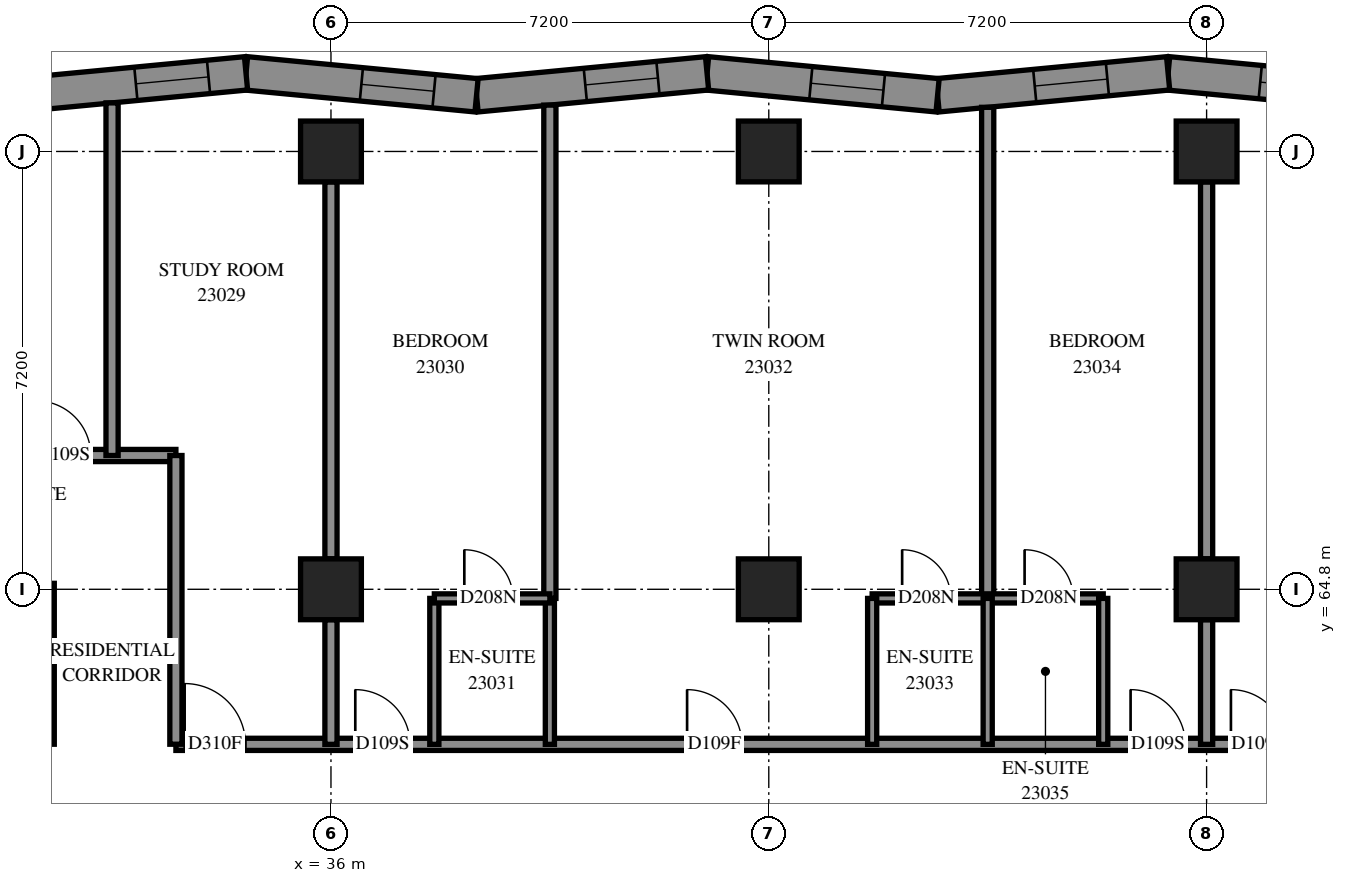
"""IFC4 building model, lengths in metres.
Left out: names, types, materials, properties, quantities, classifications, styles, units other than length and angle.
Written with IfcOpenShell. Run it as: python <this file> out.ifc"""

import sys

from ifc_helpers import new_model, si_unit, direction, frame, frame_2d, origin, origin_2d, place, context, subcontext, project, spatial, polyline, rectangle, outline, extrude, element, fill, save


model = new_model("IFC4")
c1 = context("Model", 3, precision=1e-05, world=origin(), true_north=direction((0.0, 1.0)))
c2 = subcontext(c1, "Body", "Model", "MODEL_VIEW")
j1 = project(units=[si_unit("LENGTHUNIT", "METRE"), si_unit("PLANEANGLEUNIT", "RADIAN")], contexts=[c1])
p1 = place(None, origin())
s1 = spatial("IfcSite", under=j1, at=p1, CompositionType="ELEMENT")
p2 = place(p1, origin())
s2 = spatial("IfcBuilding", under=s1, at=p2, CompositionType="ELEMENT")
p3 = place(p2, frame((0.0, 0.0, 88.0)))
s3 = spatial("IfcBuildingStorey", under=s2, at=p3, CompositionType="ELEMENT", Elevation=88.0)
for number, where, z_axis, x_axis in (
    (1, (36.0, 64.8, 0.0), (0.0, 0.0, 1.0), (1.0, 0.0, 0.0)),
    (2, (36.0, 72.0, 0.0), (0.0, 0.0, 1.0), (1.0, 0.0, 0.0)),
    (3, (43.2, 64.8, 0.0), (0.0, 0.0, 1.0), (1.0, 0.0, 0.0)),
    (4, (43.2, 72.0, 0.0), (0.0, 0.0, 1.0), (1.0, 0.0, 0.0)),
    (5, (50.4, 64.8, 0.0), (0.0, 0.0, 1.0), (1.0, 0.0, 0.0)),
    (6, (50.4, 72.0, 0.0), (0.0, 0.0, 1.0), (1.0, 0.0, 0.0)),
):
    element("IfcColumn", number, at=place(p3, frame(where, z_axis=z_axis, x_axis=x_axis)), inside=s3, PredefinedType="COLUMN", context=c2, shape_type="SweptSolid", body=[
        extrude(rectangle(XDim=1.0, YDim=1.0, at=origin_2d()), origin(), (0.0, 0.0, 1.0), 3.1),
    ])
p4 = place(p3, frame((53.558, 72.924, 0.0), z_axis=(0.0, 0.0, 1.0), x_axis=(-0.9954966527, 0.0947967005, 0.0)))
e7 = element("IfcWall", 7, at=p4, inside=s3, PredefinedType="SOLIDWALL", context=c2, shape_type="SweptSolid", body=[
    extrude(outline(polyline([(0.026, -0.275), (3.834, -0.275), (3.782, 0.275), (-0.026, 0.275), (0.026, -0.275)])), origin(), (0.0, 0.0, 1.0), 3.1),
])
p5 = place(p4, frame((1.086, 0.0, 0.5)))
e8 = element("IfcOpeningElement", 8, at=p5, cuts=e7, PredefinedType="OPENING", context=c2, shape_type="SweptSolid", body=[
    extrude(rectangle(XDim=1.2, YDim=2.45, at=frame_2d((0.6, 1.225))), frame((0.0, 0.285, 0.0), z_axis=(0.0, -1.0, 0.0), x_axis=(1.0, 0.0, 0.0)), (0.0, 0.0, 1.0), 0.57),
])
p6 = place(p3, frame((49.767, 73.285, 0.0), z_axis=(0.0, 0.0, 1.0), x_axis=(-0.9954966527, -0.0947967005, 0.0)))
e9 = element("IfcWall", 9, at=p6, inside=s3, PredefinedType="SOLIDWALL", context=c2, shape_type="SweptSolid", body=[
    extrude(outline(polyline([(-0.026, -0.275), (3.782, -0.275), (3.834, 0.275), (0.026, 0.275), (-0.026, -0.275)])), origin(), (0.0, 0.0, 1.0), 3.1),
])
p7 = place(p6, frame((1.003, 0.0, 0.5)))
e10 = element("IfcOpeningElement", 10, at=p7, cuts=e9, PredefinedType="OPENING", context=c2, shape_type="SweptSolid", body=[
    extrude(rectangle(XDim=1.2, YDim=2.45, at=frame_2d((0.6, 1.225))), frame((0.0, 0.285, 0.0), z_axis=(0.0, -1.0, 0.0), x_axis=(1.0, 0.0, 0.0)), (0.0, 0.0, 1.0), 0.57),
])
p8 = place(p3, frame((45.976, 72.924, 0.0), z_axis=(0.0, 0.0, 1.0), x_axis=(-0.9954966527, 0.0947967005, 0.0)))
e11 = element("IfcWall", 11, at=p8, inside=s3, PredefinedType="SOLIDWALL", context=c2, shape_type="SweptSolid", body=[
    extrude(outline(polyline([(0.026, -0.275), (3.834, -0.275), (3.782, 0.275), (-0.026, 0.275), (0.026, -0.275)])), origin(), (0.0, 0.0, 1.0), 3.1),
])
p9 = place(p8, frame((0.894, 0.0, 0.5)))
e12 = element("IfcOpeningElement", 12, at=p9, cuts=e11, PredefinedType="OPENING", context=c2, shape_type="SweptSolid", body=[
    extrude(rectangle(XDim=1.2, YDim=2.45, at=frame_2d((0.6, 1.225))), frame((0.0, 0.285, 0.0), z_axis=(0.0, -1.0, 0.0), x_axis=(1.0, 0.0, 0.0)), (0.0, 0.0, 1.0), 0.57),
])
p10 = place(p3, frame((42.185, 73.285, 0.0), z_axis=(0.0, 0.0, 1.0), x_axis=(-0.9954966527, -0.0947967005, 0.0)))
e13 = element("IfcWall", 13, at=p10, inside=s3, PredefinedType="SOLIDWALL", context=c2, shape_type="SweptSolid", body=[
    extrude(outline(polyline([(-0.026, -0.275), (3.782, -0.275), (3.834, 0.275), (0.026, 0.275), (-0.026, -0.275)])), origin(), (0.0, 0.0, 1.0), 3.1),
])
p11 = place(p10, frame((0.811, 0.0, 0.5)))
e14 = element("IfcOpeningElement", 14, at=p11, cuts=e13, PredefinedType="OPENING", context=c2, shape_type="SweptSolid", body=[
    extrude(rectangle(XDim=1.2, YDim=2.45, at=frame_2d((0.6, 1.225))), frame((0.0, 0.285, 0.0), z_axis=(0.0, -1.0, 0.0), x_axis=(1.0, 0.0, 0.0)), (0.0, 0.0, 1.0), 0.57),
])
p12 = place(p3, frame((38.394, 72.924, 0.0), z_axis=(0.0, 0.0, 1.0), x_axis=(-0.9954968887, 0.0947942225, 0.0)))
e15 = element("IfcWall", 15, at=p12, inside=s3, PredefinedType="SOLIDWALL", context=c2, shape_type="SweptSolid", body=[
    extrude(outline(polyline([(0.026, -0.275), (3.834, -0.275), (3.782, 0.275), (-0.026, 0.275), (0.026, -0.275)])), origin(), (0.0, 0.0, 1.0), 3.1),
])
p13 = place(p12, frame((0.702, 0.0, 0.5)))
e16 = element("IfcOpeningElement", 16, at=p13, cuts=e15, PredefinedType="OPENING", context=c2, shape_type="SweptSolid", body=[
    extrude(rectangle(XDim=1.2, YDim=2.45, at=frame_2d((0.6, 1.225))), frame((0.0, 0.285, 0.0), z_axis=(0.0, -1.0, 0.0), x_axis=(1.0, 0.0, 0.0)), (0.0, 0.0, 1.0), 0.57),
])
p14 = place(p3, frame((34.603, 73.285, 0.0), z_axis=(0.0, 0.0, 1.0), x_axis=(-0.9954966527, -0.0947967005, 0.0)))
e17 = element("IfcWall", 17, at=p14, inside=s3, PredefinedType="SOLIDWALL", context=c2, shape_type="SweptSolid", body=[
    extrude(outline(polyline([(-0.026, -0.275), (3.782, -0.275), (3.834, 0.275), (0.026, 0.275), (-0.026, -0.275)])), origin(), (0.0, 0.0, 1.0), 3.1),
])
p15 = place(p14, frame((0.62, 0.0, 0.5)))
e18 = element("IfcOpeningElement", 18, at=p15, cuts=e17, PredefinedType="OPENING", context=c2, shape_type="SweptSolid", body=[
    extrude(rectangle(XDim=1.2, YDim=2.45, at=frame_2d((0.6, 1.225))), frame((0.0, 0.285, 0.0), z_axis=(0.0, -1.0, 0.0), x_axis=(1.0, 0.0, 0.0)), (0.0, 0.0, 1.0), 0.57),
])
p16 = place(p3, frame((33.45, 62.25, 0.0), z_axis=(0.0, 0.0, 1.0), x_axis=(1.0, 0.0, 0.0)))
e19 = element("IfcWall", 19, at=p16, inside=s3, PredefinedType="PARTITIONING", context=c2, shape_type="SweptSolid", body=[
    extrude(rectangle(XDim=21.85, YDim=0.2, at=frame_2d((10.925, 0.0))), origin(), (0.0, 0.0, 1.0), 3.1),
])
p17 = place(p16, frame((0.144, 0.0, 0.0)))
e20 = element("IfcOpeningElement", 20, at=p17, cuts=e19, PredefinedType="OPENING", context=c2, shape_type="SweptSolid", body=[
    extrude(rectangle(XDim=1.0, YDim=2.1, at=frame_2d((0.5, 1.05))), frame((0.0, 0.11, 0.0), z_axis=(0.0, -1.0, 0.0), x_axis=(1.0, 0.0, 0.0)), (0.0, 0.0, 1.0), 0.22),
])
p18 = place(p16, frame((2.95, 0.0, 0.0)))
e21 = element("IfcOpeningElement", 21, at=p18, cuts=e19, PredefinedType="OPENING", context=c2, shape_type="SweptSolid", body=[
    extrude(rectangle(XDim=0.9, YDim=2.1, at=frame_2d((0.45, 1.05))), frame((0.0, 0.11, 0.0), z_axis=(0.0, -1.0, 0.0), x_axis=(1.0, 0.0, 0.0)), (0.0, 0.0, 1.0), 0.22),
])
p19 = place(p16, frame((8.407, 0.0, 0.0)))
e22 = element("IfcOpeningElement", 22, at=p19, cuts=e19, PredefinedType="OPENING", context=c2, shape_type="SweptSolid", body=[
    extrude(rectangle(XDim=0.9, YDim=2.1, at=frame_2d((0.45, 1.05))), frame((0.0, 0.11, 0.0), z_axis=(0.0, -1.0, 0.0), x_axis=(1.0, 0.0, 0.0)), (0.0, 0.0, 1.0), 0.22),
])
p20 = place(p16, frame((15.7, 0.0, 0.0)))
e23 = element("IfcOpeningElement", 23, at=p20, cuts=e19, PredefinedType="OPENING", context=c2, shape_type="SweptSolid", body=[
    extrude(rectangle(XDim=0.9, YDim=2.1, at=frame_2d((0.45, 1.05))), frame((0.0, 0.11, 0.0), z_axis=(0.0, -1.0, 0.0), x_axis=(1.0, 0.0, 0.0)), (0.0, 0.0, 1.0), 0.22),
])
p21 = place(p16, frame((17.35, 0.0, 0.0)))
e24 = element("IfcOpeningElement", 24, at=p21, cuts=e19, PredefinedType="OPENING", context=c2, shape_type="SweptSolid", body=[
    extrude(rectangle(XDim=0.9, YDim=2.1, at=frame_2d((0.45, 1.05))), frame((0.0, 0.11, 0.0), z_axis=(0.0, -1.0, 0.0), x_axis=(1.0, 0.0, 0.0)), (0.0, 0.0, 1.0), 0.22),
])
p22 = place(p3, frame((21.602, 67.0, 0.0), z_axis=(0.0, 0.0, 1.0), x_axis=(1.0, 0.0, 0.0)))
e25 = element("IfcWall", 25, at=p22, inside=s3, PredefinedType="PARTITIONING", context=c2, shape_type="SweptSolid", body=[
    extrude(rectangle(XDim=11.848, YDim=0.2, at=frame_2d((5.924, 0.0))), origin(), (0.0, 0.0, 1.0), 3.1),
])
p23 = place(p22, frame((1.791, 0.0, 0.0)))
e26 = element("IfcOpeningElement", 26, at=p23, cuts=e25, PredefinedType="OPENING", context=c2, shape_type="SweptSolid", body=[
    extrude(rectangle(XDim=1.0, YDim=2.1, at=frame_2d((0.5, 1.05))), frame((0.0, 0.11, 0.0), z_axis=(0.0, -1.0, 0.0), x_axis=(1.0, 0.0, 0.0)), (0.0, 0.0, 1.0), 0.22),
])
p24 = place(p22, frame((3.998, 0.0, 0.0)))
e27 = element("IfcOpeningElement", 27, at=p24, cuts=e25, PredefinedType="OPENING", context=c2, shape_type="SweptSolid", body=[
    extrude(rectangle(XDim=0.9, YDim=2.1, at=frame_2d((0.45, 1.05))), frame((0.0, 0.11, 0.0), z_axis=(0.0, -1.0, 0.0), x_axis=(1.0, 0.0, 0.0)), (0.0, 0.0, 1.0), 0.22),
])
p25 = place(p22, frame((9.548, 0.0, 0.0)))
e28 = element("IfcOpeningElement", 28, at=p25, cuts=e25, PredefinedType="OPENING", context=c2, shape_type="SweptSolid", body=[
    extrude(rectangle(XDim=0.9, YDim=2.1, at=frame_2d((0.45, 1.05))), frame((0.0, 0.11, 0.0), z_axis=(0.0, -1.0, 0.0), x_axis=(1.0, 0.0, 0.0)), (0.0, 0.0, 1.0), 0.22),
])
p26 = place(p3, frame((39.6, 64.65, 0.0), z_axis=(0.0, 0.0, 1.0), x_axis=(0.0, 1.0, 0.0)))
e29 = element("IfcWall", 29, at=p26, inside=s3, PredefinedType="PARTITIONING", context=c2, shape_type="SweptSolid", body=[
    extrude(rectangle(XDim=8.112, YDim=0.2, at=frame_2d((4.056, 0.0))), origin(), (0.0, 0.0, 1.0), 3.1),
])
p27 = place(p3, frame((46.8, 64.65, 0.0), z_axis=(0.0, 0.0, 1.0), x_axis=(0.0, 1.0, 0.0)))
e30 = element("IfcWall", 30, at=p27, inside=s3, PredefinedType="PARTITIONING", context=c2, shape_type="SweptSolid", body=[
    extrude(rectangle(XDim=8.076, YDim=0.2, at=frame_2d((4.038, 0.0))), origin(), (0.0, 0.0, 1.0), 3.1),
])
for number, where, z_axis, x_axis in (
    (31, (36.0, 65.3, 0.0), (0.0, 0.0, 1.0), (0.0, 1.0, 0.0)),
    (32, (50.4, 65.3, 0.0), (0.0, 0.0, 1.0), (0.0, 1.0, 0.0)),
):
    element("IfcWall", number, at=place(p3, frame(where, z_axis=z_axis, x_axis=x_axis)), inside=s3, PredefinedType="PARTITIONING", context=c2, shape_type="SweptSolid", body=[
        extrude(rectangle(XDim=6.2, YDim=0.2, at=frame_2d((3.1, 0.0))), origin(), (0.0, 0.0, 1.0), 3.1),
    ])
p28 = place(p3, frame((32.4, 67.0, 0.0), z_axis=(0.0, 0.0, 1.0), x_axis=(0.0, 1.0, 0.0)))
e33 = element("IfcWall", 33, at=p28, inside=s3, PredefinedType="PARTITIONING", context=c2, shape_type="SweptSolid", body=[
    extrude(rectangle(XDim=5.799, YDim=0.2, at=frame_2d((2.899, 0.0))), origin(), (0.0, 0.0, 1.0), 3.1),
])
p29 = place(p3, frame((33.45, 62.252, 0.0), z_axis=(0.0, 0.0, 1.0), x_axis=(0.0, 1.0, 0.0)))
e34 = element("IfcWall", 34, at=p29, inside=s3, PredefinedType="PARTITIONING", context=c2, shape_type="SweptSolid", body=[
    extrude(rectangle(XDim=4.748, YDim=0.2, at=frame_2d((2.374, 0.0))), origin(), (0.0, 0.0, 1.0), 3.1),
])
p30 = place(p3, frame((44.9, 64.65, 0.0), z_axis=(0.0, 0.0, 1.0), x_axis=(1.0, 0.0, 0.0)))
e35 = element("IfcWall", 35, at=p30, inside=s3, PredefinedType="PARTITIONING", context=c2, shape_type="SweptSolid", body=[
    extrude(rectangle(XDim=3.8, YDim=0.15, at=frame_2d((1.9, 0.0))), origin(), (0.0, 0.0, 1.0), 3.1),
])
p31 = place(p30, frame((0.493, 0.0, 0.0)))
e36 = element("IfcOpeningElement", 36, at=p31, cuts=e35, PredefinedType="OPENING", context=c2, shape_type="SweptSolid", body=[
    extrude(rectangle(XDim=0.8, YDim=2.1, at=frame_2d((0.4, 1.05))), frame((0.0, 0.085, 0.0), z_axis=(0.0, -1.0, 0.0), x_axis=(1.0, 0.0, 0.0)), (0.0, 0.0, 1.0), 0.17),
])
p32 = place(p30, frame((2.507, 0.0, 0.0)))
e37 = element("IfcOpeningElement", 37, at=p32, cuts=e35, PredefinedType="OPENING", context=c2, shape_type="SweptSolid", body=[
    extrude(rectangle(XDim=0.8, YDim=2.1, at=frame_2d((0.4, 1.05))), frame((0.0, 0.085, 0.0), z_axis=(0.0, -1.0, 0.0), x_axis=(1.0, 0.0, 0.0)), (0.0, 0.0, 1.0), 0.17),
])
p33 = place(p3, frame((31.35, 62.252, 0.0), z_axis=(0.0, 0.0, 1.0), x_axis=(0.0, 1.0, 0.0)))
e38 = element("IfcWall", 38, at=p33, inside=s3, PredefinedType="PARTITIONING", context=c2, shape_type="SweptSolid", body=[
    extrude(rectangle(XDim=2.646, YDim=0.2, at=frame_2d((1.323, 0.0))), origin(), (0.0, 0.0, 1.0), 3.1),
])
for number, where, z_axis, x_axis in (
    (39, (37.7, 62.25, 0.0), (0.0, 0.0, 1.0), (0.0, 1.0, 0.0)),
    (40, (39.6, 62.25, 0.0), (0.0, 0.0, 1.0), (0.0, 1.0, 0.0)),
    (41, (44.9, 62.25, 0.0), (0.0, 0.0, 1.0), (0.0, 1.0, 0.0)),
    (42, (46.8, 62.25, 0.0), (0.0, 0.0, 1.0), (0.0, 1.0, 0.0)),
    (43, (48.7, 62.25, 0.0), (0.0, 0.0, 1.0), (0.0, 1.0, 0.0)),
):
    element("IfcWall", number, at=place(p3, frame(where, z_axis=z_axis, x_axis=x_axis)), inside=s3, PredefinedType="PARTITIONING", context=c2, shape_type="SweptSolid", body=[
        extrude(rectangle(XDim=2.4, YDim=0.15, at=frame_2d((1.2, 0.0))), origin(), (0.0, 0.0, 1.0), 3.1),
    ])
for number, where, z_axis, x_axis in (
    (44, (36.0, 62.25, 0.0), (0.0, 0.0, 1.0), (0.0, 1.0, 0.0)),
    (45, (50.4, 62.25, 0.0), (0.0, 0.0, 1.0), (0.0, 1.0, 0.0)),
):
    element("IfcWall", number, at=place(p3, frame(where, z_axis=z_axis, x_axis=x_axis)), inside=s3, PredefinedType="PARTITIONING", context=c2, shape_type="SweptSolid", body=[
        extrude(rectangle(XDim=2.05, YDim=0.2, at=frame_2d((1.025, 0.0))), origin(), (0.0, 0.0, 1.0), 3.1),
    ])
p34 = place(p3, frame((37.7, 64.65, 0.0), z_axis=(0.0, 0.0, 1.0), x_axis=(1.0, 0.0, 0.0)))
e46 = element("IfcWall", 46, at=p34, inside=s3, PredefinedType="PARTITIONING", context=c2, shape_type="SweptSolid", body=[
    extrude(rectangle(XDim=1.9, YDim=0.15, at=frame_2d((0.95, 0.0))), origin(), (0.0, 0.0, 1.0), 3.1),
])
p35 = place(p34, frame((0.493, 0.0, 0.0)))
e47 = element("IfcOpeningElement", 47, at=p35, cuts=e46, PredefinedType="OPENING", context=c2, shape_type="SweptSolid", body=[
    extrude(rectangle(XDim=0.8, YDim=2.1, at=frame_2d((0.4, 1.05))), frame((0.0, 0.085, 0.0), z_axis=(0.0, -1.0, 0.0), x_axis=(1.0, 0.0, 0.0)), (0.0, 0.0, 1.0), 0.17),
])
p36 = place(p5, origin())
e48 = element("IfcWindow", 48, at=p36, inside=s3, PartitioningType="SINGLE_PANEL", PredefinedType="WINDOW", context=c2, shape_type="SweptSolid", body=[
    extrude(rectangle(XDim=1.2, YDim=2.45, at=frame_2d((0.6, 1.225))), frame((0.0, 0.155, 0.0), z_axis=(0.0, -1.0, 0.0), x_axis=(1.0, 0.0, 0.0)), (0.0, 0.0, 1.0), 0.06),
])
fill(e8, e48)
p37 = place(p7, origin())
e49 = element("IfcWindow", 49, at=p37, inside=s3, PartitioningType="SINGLE_PANEL", PredefinedType="WINDOW", context=c2, shape_type="SweptSolid", body=[
    extrude(rectangle(XDim=1.2, YDim=2.45, at=frame_2d((0.6, 1.225))), frame((0.0, 0.155, 0.0), z_axis=(0.0, -1.0, 0.0), x_axis=(1.0, 0.0, 0.0)), (0.0, 0.0, 1.0), 0.06),
])
fill(e10, e49)
p38 = place(p9, origin())
e50 = element("IfcWindow", 50, at=p38, inside=s3, PartitioningType="SINGLE_PANEL", PredefinedType="WINDOW", context=c2, shape_type="SweptSolid", body=[
    extrude(rectangle(XDim=1.2, YDim=2.45, at=frame_2d((0.6, 1.225))), frame((0.0, 0.155, 0.0), z_axis=(0.0, -1.0, 0.0), x_axis=(1.0, 0.0, 0.0)), (0.0, 0.0, 1.0), 0.06),
])
fill(e12, e50)
p39 = place(p11, origin())
e51 = element("IfcWindow", 51, at=p39, inside=s3, PartitioningType="SINGLE_PANEL", PredefinedType="WINDOW", context=c2, shape_type="SweptSolid", body=[
    extrude(rectangle(XDim=1.2, YDim=2.45, at=frame_2d((0.6, 1.225))), frame((0.0, 0.155, 0.0), z_axis=(0.0, -1.0, 0.0), x_axis=(1.0, 0.0, 0.0)), (0.0, 0.0, 1.0), 0.06),
])
fill(e14, e51)
p40 = place(p13, origin())
e52 = element("IfcWindow", 52, at=p40, inside=s3, PartitioningType="SINGLE_PANEL", PredefinedType="WINDOW", context=c2, shape_type="SweptSolid", body=[
    extrude(rectangle(XDim=1.2, YDim=2.45, at=frame_2d((0.6, 1.225))), frame((0.0, 0.155, 0.0), z_axis=(0.0, -1.0, 0.0), x_axis=(1.0, 0.0, 0.0)), (0.0, 0.0, 1.0), 0.06),
])
fill(e16, e52)
p41 = place(p15, origin())
e53 = element("IfcWindow", 53, at=p41, inside=s3, PartitioningType="SINGLE_PANEL", PredefinedType="WINDOW", context=c2, shape_type="SweptSolid", body=[
    extrude(rectangle(XDim=1.2, YDim=2.45, at=frame_2d((0.6, 1.225))), frame((0.0, 0.155, 0.0), z_axis=(0.0, -1.0, 0.0), x_axis=(1.0, 0.0, 0.0)), (0.0, 0.0, 1.0), 0.06),
])
fill(e18, e53)
p42 = place(p25, origin())
e54 = element("IfcDoor", 54, at=p42, inside=s3, OperationType="SINGLE_SWING_RIGHT", PredefinedType="DOOR", context=c2, shape_type="SweptSolid", body=[
    extrude(rectangle(XDim=0.9, YDim=2.1, at=frame_2d((0.45, 1.05))), frame((0.0, 0.025, 0.0), z_axis=(0.0, -1.0, 0.0), x_axis=(1.0, 0.0, 0.0)), (0.0, 0.0, 1.0), 0.05),
])
fill(e28, e54)
p43 = place(p17, origin())
e55 = element("IfcDoor", 55, at=p43, inside=s3, OperationType="SINGLE_SWING_LEFT", PredefinedType="DOOR", context=c2, shape_type="SweptSolid", body=[
    extrude(rectangle(XDim=1.0, YDim=2.1, at=frame_2d((0.5, 1.05))), frame((0.0, 0.025, 0.0), z_axis=(0.0, -1.0, 0.0), x_axis=(1.0, 0.0, 0.0)), (0.0, 0.0, 1.0), 0.05),
])
fill(e20, e55)
p44 = place(p18, origin())
e56 = element("IfcDoor", 56, at=p44, inside=s3, OperationType="SINGLE_SWING_RIGHT", PredefinedType="DOOR", context=c2, shape_type="SweptSolid", body=[
    extrude(rectangle(XDim=0.9, YDim=2.1, at=frame_2d((0.45, 1.05))), frame((0.0, 0.025, 0.0), z_axis=(0.0, -1.0, 0.0), x_axis=(1.0, 0.0, 0.0)), (0.0, 0.0, 1.0), 0.05),
])
fill(e21, e56)
p45 = place(p35, origin())
e57 = element("IfcDoor", 57, at=p45, inside=s3, OperationType="SINGLE_SWING_RIGHT", PredefinedType="DOOR", context=c2, shape_type="SweptSolid", body=[
    extrude(rectangle(XDim=0.8, YDim=2.1, at=frame_2d((0.4, 1.05))), frame((0.0, 0.025, 0.0), z_axis=(0.0, -1.0, 0.0), x_axis=(1.0, 0.0, 0.0)), (0.0, 0.0, 1.0), 0.05),
])
fill(e47, e57)
p46 = place(p19, origin())
e58 = element("IfcDoor", 58, at=p46, inside=s3, OperationType="SINGLE_SWING_LEFT", PredefinedType="DOOR", context=c2, shape_type="SweptSolid", body=[
    extrude(rectangle(XDim=0.9, YDim=2.1, at=frame_2d((0.45, 1.05))), frame((0.0, 0.025, 0.0), z_axis=(0.0, -1.0, 0.0), x_axis=(1.0, 0.0, 0.0)), (0.0, 0.0, 1.0), 0.05),
])
fill(e22, e58)
p47 = place(p31, origin())
e59 = element("IfcDoor", 59, at=p47, inside=s3, OperationType="SINGLE_SWING_RIGHT", PredefinedType="DOOR", context=c2, shape_type="SweptSolid", body=[
    extrude(rectangle(XDim=0.8, YDim=2.1, at=frame_2d((0.4, 1.05))), frame((0.0, 0.025, 0.0), z_axis=(0.0, -1.0, 0.0), x_axis=(1.0, 0.0, 0.0)), (0.0, 0.0, 1.0), 0.05),
])
fill(e36, e59)
p48 = place(p20, origin())
e60 = element("IfcDoor", 60, at=p48, inside=s3, OperationType="SINGLE_SWING_LEFT", PredefinedType="DOOR", context=c2, shape_type="SweptSolid", body=[
    extrude(rectangle(XDim=0.9, YDim=2.1, at=frame_2d((0.45, 1.05))), frame((0.0, 0.025, 0.0), z_axis=(0.0, -1.0, 0.0), x_axis=(1.0, 0.0, 0.0)), (0.0, 0.0, 1.0), 0.05),
])
fill(e23, e60)
p49 = place(p32, origin())
e61 = element("IfcDoor", 61, at=p49, inside=s3, OperationType="SINGLE_SWING_RIGHT", PredefinedType="DOOR", context=c2, shape_type="SweptSolid", body=[
    extrude(rectangle(XDim=0.8, YDim=2.1, at=frame_2d((0.4, 1.05))), frame((0.0, 0.025, 0.0), z_axis=(0.0, -1.0, 0.0), x_axis=(1.0, 0.0, 0.0)), (0.0, 0.0, 1.0), 0.05),
])
fill(e37, e61)
p50 = place(p21, origin())
e62 = element("IfcDoor", 62, at=p50, inside=s3, OperationType="SINGLE_SWING_RIGHT", PredefinedType="DOOR", context=c2, shape_type="SweptSolid", body=[
    extrude(rectangle(XDim=0.9, YDim=2.1, at=frame_2d((0.45, 1.05))), frame((0.0, 0.025, 0.0), z_axis=(0.0, -1.0, 0.0), x_axis=(1.0, 0.0, 0.0)), (0.0, 0.0, 1.0), 0.05),
])
fill(e24, e62)
save(model, sys.argv[1])
